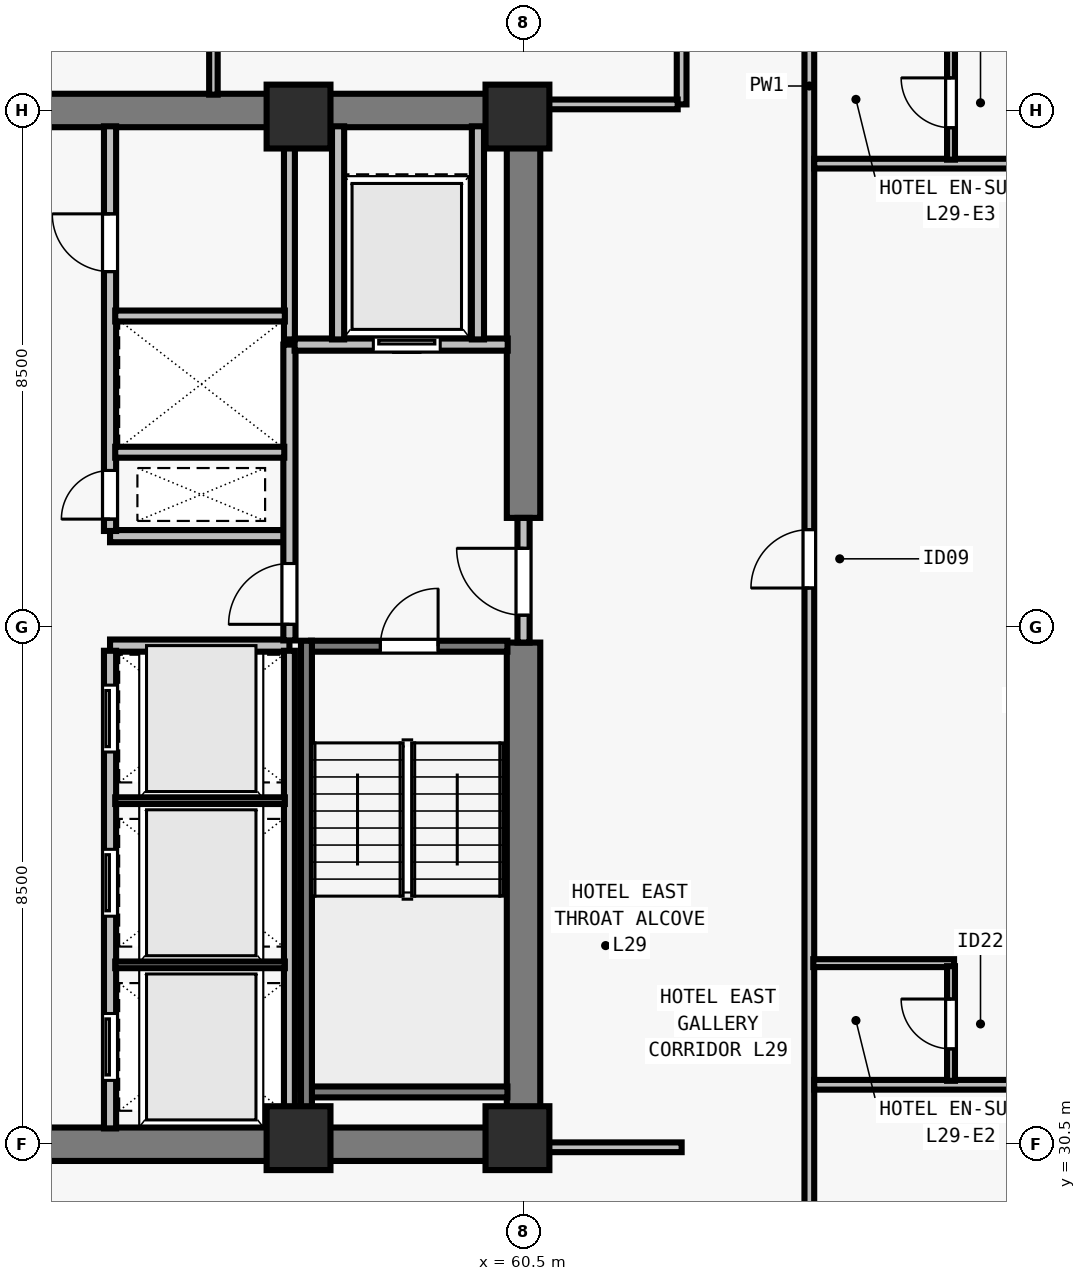
"""IFC4 building model, lengths in metres.
Left out: names, types, materials, properties, quantities, classifications, styles, units other than length and angle.
Written with IfcOpenShell. Run it as: python <this file> out.ifc"""

import sys

from ifc_helpers import new_model, si_unit, direction, frame, frame_2d, origin, origin_2d, place, context, subcontext, project, spatial, rectangle, extrude, element, fill, save


model = new_model("IFC4")
c1 = context("Model", 3, precision=1e-05, world=origin(), true_north=direction((0.0, 1.0)))
c2 = subcontext(c1, "Body", "Model", "MODEL_VIEW")
j1 = project(units=[si_unit("LENGTHUNIT", "METRE"), si_unit("PLANEANGLEUNIT", "RADIAN")], contexts=[c1])
p1 = place(None, origin())
s1 = spatial("IfcSite", under=j1, at=p1, CompositionType="ELEMENT")
p2 = place(p1, origin())
s2 = spatial("IfcBuilding", under=s1, at=p2, CompositionType="ELEMENT")
p3 = place(p2, frame((0.0, 0.0, 109.5)))
s3 = spatial("IfcBuildingStorey", under=s2, at=p3, CompositionType="ELEMENT", Elevation=109.5)
for number, where, z_axis, x_axis in (
    (1, (56.8, 30.6, 0.0), (0.0, 0.0, 1.0), (1.0, 0.0, 0.0)),
    (2, (60.4, 30.6, 0.0), (0.0, 0.0, 1.0), (1.0, 0.0, 0.0)),
    (3, (56.8, 47.4, 0.0), (0.0, 0.0, 1.0), (1.0, 0.0, 0.0)),
    (4, (60.4, 47.4, 0.0), (0.0, 0.0, 1.0), (1.0, 0.0, 0.0)),
):
    element("IfcColumn", number, at=place(p3, frame(where, z_axis=z_axis, x_axis=x_axis)), inside=s3, PredefinedType="COLUMN", context=c2, shape_type="SweptSolid", body=[
        extrude(rectangle(XDim=1.05, YDim=1.05, at=origin_2d()), origin(), (0.0, 0.0, 1.0), 3.5),
    ])
for number, where, z_axis, x_axis in (
    (5, (43.225, 30.5, 0.0), (0.0, 0.0, 1.0), (1.0, 0.0, 0.0)),
    (6, (43.225, 47.5, 0.0), (0.0, 0.0, 1.0), (1.0, 0.0, 0.0)),
):
    element("IfcWall", number, at=place(p3, frame(where, z_axis=z_axis, x_axis=x_axis)), inside=s3, PredefinedType="SHEAR", context=c2, shape_type="SweptSolid", body=[
        extrude(rectangle(XDim=17.55, YDim=0.55, at=frame_2d((8.775, 0.0))), origin(), (0.0, 0.0, 1.0), 3.28),
    ])
p4 = place(p3, frame((60.5, 30.765, 0.0), z_axis=(0.0, 0.0, 1.0), x_axis=(0.0, 1.0, 0.0)))
e7 = element("IfcWall", 7, at=p4, inside=s3, PredefinedType="SHEAR", context=c2, shape_type="SweptSolid", body=[
    extrude(rectangle(XDim=7.985, YDim=0.55, at=frame_2d((3.993, 0.0))), origin(), (0.0, 0.0, 1.0), 3.28),
])
p5 = place(p3, frame((60.5, 40.8, 0.0), z_axis=(0.0, 0.0, 1.0), x_axis=(0.0, 1.0, 0.0)))
e8 = element("IfcWall", 8, at=p5, inside=s3, PredefinedType="SHEAR", context=c2, shape_type="SweptSolid", body=[
    extrude(rectangle(XDim=6.435, YDim=0.55, at=frame_2d((3.218, 0.0))), origin(), (0.0, 0.0, 1.0), 3.28),
])
for number, where, z_axis, x_axis in (
    (9, (53.7, 38.7, 0.0), (0.0, 0.0, 1.0), (1.0, 0.0, 0.0)),
    (10, (53.7, 40.5, 0.0), (0.0, 0.0, 1.0), (1.0, 0.0, 0.0)),
):
    element("IfcWall", number, at=place(p3, frame(where, z_axis=z_axis, x_axis=x_axis)), inside=s3, PredefinedType="SOLIDWALL", context=c2, shape_type="SweptSolid", body=[
        extrude(rectangle(XDim=2.95, YDim=0.2, at=frame_2d((1.475, 0.0))), origin(), (0.0, 0.0, 1.0), 3.28),
    ])
p6 = place(p3, frame((53.7, 30.76, 0.0), z_axis=(0.0, 0.0, 1.0), x_axis=(0.0, 1.0, 0.0)))
e11 = element("IfcWall", 11, at=p6, inside=s3, PredefinedType="SOLIDWALL", context=c2, shape_type="SweptSolid", body=[
    extrude(rectangle(XDim=7.855, YDim=0.2, at=frame_2d((3.927, 0.0))), origin(), (0.0, 0.0, 1.0), 3.28),
])
p7 = place(p6, frame((0.79, 0.0, 0.0)))
e12 = element("IfcOpeningElement", 12, at=p7, cuts=e11, PredefinedType="OPENING", context=c2, shape_type="SweptSolid", body=[
    extrude(rectangle(XDim=1.1, YDim=2.2, at=frame_2d((0.55, 1.1))), frame((0.0, 0.11, 0.0), z_axis=(0.0, -1.0, 0.0), x_axis=(1.0, 0.0, 0.0)), (0.0, 0.0, 1.0), 0.22),
])
p8 = place(p6, frame((3.49, 0.0, 0.0)))
e13 = element("IfcOpeningElement", 13, at=p8, cuts=e11, PredefinedType="OPENING", context=c2, shape_type="SweptSolid", body=[
    extrude(rectangle(XDim=1.1, YDim=2.2, at=frame_2d((0.55, 1.1))), frame((0.0, 0.11, 0.0), z_axis=(0.0, -1.0, 0.0), x_axis=(1.0, 0.0, 0.0)), (0.0, 0.0, 1.0), 0.22),
])
p9 = place(p6, frame((6.19, 0.0, 0.0)))
e14 = element("IfcOpeningElement", 14, at=p9, cuts=e11, PredefinedType="OPENING", context=c2, shape_type="SweptSolid", body=[
    extrude(rectangle(XDim=1.1, YDim=2.2, at=frame_2d((0.55, 1.1))), frame((0.0, 0.11, 0.0), z_axis=(0.0, -1.0, 0.0), x_axis=(1.0, 0.0, 0.0)), (0.0, 0.0, 1.0), 0.22),
])
p10 = place(p3, frame((53.7, 40.585, 0.0), z_axis=(0.0, 0.0, 1.0), x_axis=(0.0, 1.0, 0.0)))
e15 = element("IfcWall", 15, at=p10, inside=s3, PredefinedType="SOLIDWALL", context=c2, shape_type="SweptSolid", body=[
    extrude(rectangle(XDim=6.655, YDim=0.2, at=frame_2d((3.328, 0.0))), origin(), (0.0, 0.0, 1.0), 3.28),
])
p11 = place(p10, frame((0.195, 0.0, 0.0)))
e16 = element("IfcOpeningElement", 16, at=p11, cuts=e15, PredefinedType="OPENING", context=c2, shape_type="SweptSolid", body=[
    extrude(rectangle(XDim=0.8, YDim=2.08, at=frame_2d((0.4, 1.04))), frame((0.0, 0.11, 0.0), z_axis=(0.0, -1.0, 0.0), x_axis=(1.0, 0.0, 0.0)), (0.0, 0.0, 1.0), 0.22),
])
p12 = place(p10, frame((4.265, 0.0, 0.0)))
e17 = element("IfcOpeningElement", 17, at=p12, cuts=e15, PredefinedType="OPENING", context=c2, shape_type="SweptSolid", body=[
    extrude(rectangle(XDim=0.95, YDim=2.12, at=frame_2d((0.475, 1.06))), frame((0.0, 0.11, 0.0), z_axis=(0.0, -1.0, 0.0), x_axis=(1.0, 0.0, 0.0)), (0.0, 0.0, 1.0), 0.22),
])
p13 = place(p3, frame((60.5, 38.75, 0.0), z_axis=(0.0, 0.0, 1.0), x_axis=(0.0, 1.0, 0.0)))
e18 = element("IfcWall", 18, at=p13, inside=s3, PredefinedType="SOLIDWALL", context=c2, shape_type="SweptSolid", body=[
    extrude(rectangle(XDim=2.05, YDim=0.2, at=frame_2d((1.025, 0.0))), origin(), (0.0, 0.0, 1.0), 3.28),
])
p14 = place(p13, frame((0.45, 0.0, 0.0)))
e19 = element("IfcOpeningElement", 19, at=p14, cuts=e18, PredefinedType="OPENING", context=c2, shape_type="SweptSolid", body=[
    extrude(rectangle(XDim=1.1, YDim=2.15, at=frame_2d((0.55, 1.075))), frame((0.0, 0.11, 0.0), z_axis=(0.0, -1.0, 0.0), x_axis=(1.0, 0.0, 0.0)), (0.0, 0.0, 1.0), 0.22),
])
p15 = place(p3, frame((56.65, 38.785, 0.0), z_axis=(0.0, 0.0, 1.0), x_axis=(0.0, 1.0, 0.0)))
e20 = element("IfcWall", 20, at=p15, inside=s3, PredefinedType="SOLIDWALL", context=c2, shape_type="SweptSolid", body=[
    extrude(rectangle(XDim=4.865, YDim=0.2, at=frame_2d((2.433, 0.0))), origin(), (0.0, 0.0, 1.0), 3.28),
])
p16 = place(p15, frame((0.265, 0.0, 0.0)))
e21 = element("IfcOpeningElement", 21, at=p16, cuts=e20, PredefinedType="OPENING", context=c2, shape_type="SweptSolid", body=[
    extrude(rectangle(XDim=1.0, YDim=2.15, at=frame_2d((0.5, 1.075))), frame((0.0, 0.11, 0.0), z_axis=(0.0, -1.0, 0.0), x_axis=(1.0, 0.0, 0.0)), (0.0, 0.0, 1.0), 0.22),
])
p17 = place(p3, frame((56.735, 43.65, 0.0), z_axis=(0.0, 0.0, 1.0), x_axis=(1.0, 0.0, 0.0)))
e22 = element("IfcWall", 22, at=p17, inside=s3, PredefinedType="SOLIDWALL", context=c2, shape_type="SweptSolid", body=[
    extrude(rectangle(XDim=3.505, YDim=0.2, at=frame_2d((1.752, 0.0))), origin(), (0.0, 0.0, 1.0), 3.28),
])
p18 = place(p17, frame((1.295, 0.0, 0.0)))
e23 = element("IfcOpeningElement", 23, at=p18, cuts=e22, PredefinedType="OPENING", context=c2, shape_type="SweptSolid", body=[
    extrude(rectangle(XDim=1.1, YDim=2.2, at=frame_2d((0.55, 1.1))), frame((0.0, 0.11, 0.0), z_axis=(0.0, -1.0, 0.0), x_axis=(1.0, 0.0, 0.0)), (0.0, 0.0, 1.0), 0.22),
])
for number, where, z_axis, x_axis in (
    (24, (57.45, 43.735, 0.0), (0.0, 0.0, 1.0), (0.0, 1.0, 0.0)),
    (25, (59.75, 43.735, 0.0), (0.0, 0.0, 1.0), (0.0, 1.0, 0.0)),
):
    element("IfcWall", number, at=place(p3, frame(where, z_axis=z_axis, x_axis=x_axis)), inside=s3, PredefinedType="SOLIDWALL", context=c2, shape_type="SweptSolid", body=[
        extrude(rectangle(XDim=3.505, YDim=0.2, at=frame_2d((1.752, 0.0))), origin(), (0.0, 0.0, 1.0), 3.28),
    ])
p19 = place(p3, frame((56.65, 30.76, 0.0), z_axis=(0.0, 0.0, 1.0), x_axis=(0.0, 1.0, 0.0)))
e26 = element("IfcWall", 26, at=p19, inside=s3, PredefinedType="SOLIDWALL", context=c2, shape_type="SweptSolid", body=[
    extrude(rectangle(XDim=7.855, YDim=0.18, at=frame_2d((3.927, 0.0))), origin(), (0.0, 0.0, 1.0), 3.28),
])
for number, where, z_axis, x_axis in (
    (27, (53.785, 33.45, 0.0), (0.0, 0.0, 1.0), (1.0, 0.0, 0.0)),
    (28, (53.785, 36.15, 0.0), (0.0, 0.0, 1.0), (1.0, 0.0, 0.0)),
):
    element("IfcWall", number, at=place(p3, frame(where, z_axis=z_axis, x_axis=x_axis)), inside=s3, PredefinedType="PARTITIONING", context=c2, shape_type="SweptSolid", body=[
        extrude(rectangle(XDim=2.79, YDim=0.11, at=frame_2d((1.395, 0.0))), origin(), (0.0, 0.0, 1.0), 3.28),
    ])
p20 = place(p3, frame((56.65, 43.735, 0.0), z_axis=(0.0, 0.0, 1.0), x_axis=(0.0, 1.0, 0.0)))
e29 = element("IfcWall", 29, at=p20, inside=s3, PredefinedType="SOLIDWALL", context=c2, shape_type="SweptSolid", body=[
    extrude(rectangle(XDim=3.505, YDim=0.18, at=frame_2d((1.752, 0.0))), origin(), (0.0, 0.0, 1.0), 3.28),
])
p21 = place(p3, frame((53.785, 41.88, 0.0), z_axis=(0.0, 0.0, 1.0), x_axis=(1.0, 0.0, 0.0)))
e30 = element("IfcWall", 30, at=p21, inside=s3, PredefinedType="SOLIDWALL", context=c2, shape_type="SweptSolid", body=[
    extrude(rectangle(XDim=2.78, YDim=0.18, at=frame_2d((1.39, 0.0))), origin(), (0.0, 0.0, 1.0), 3.28),
])
p22 = place(p3, frame((53.785, 44.12, 0.0), z_axis=(0.0, 0.0, 1.0), x_axis=(1.0, 0.0, 0.0)))
e31 = element("IfcWall", 31, at=p22, inside=s3, PredefinedType="SOLIDWALL", context=c2, shape_type="SweptSolid", body=[
    extrude(rectangle(XDim=2.79, YDim=0.18, at=frame_2d((1.395, 0.0))), origin(), (0.0, 0.0, 1.0), 3.28),
])
p23 = place(p3, frame((65.2, 15.325, 0.0), z_axis=(0.0, 0.0, 1.0), x_axis=(0.0, 1.0, 0.0)))
e32 = element("IfcWall", 32, at=p23, inside=s3, PredefinedType="PARTITIONING", context=c2, shape_type="SweptSolid", body=[
    extrude(rectangle(XDim=47.35, YDim=0.16, at=frame_2d((23.675, 0.0))), origin(), (0.0, 0.0, 1.0), 2.555),
])
p24 = place(p23, frame((8.944, 0.0, 0.0)))
e33 = element("IfcOpeningElement", 33, at=p24, cuts=e32, PredefinedType="OPENING", context=c2, shape_type="SweptSolid", body=[
    extrude(rectangle(XDim=0.96, YDim=2.15, at=frame_2d((0.48, 1.075))), frame((0.0, 0.09, 0.0), z_axis=(0.0, -1.0, 0.0), x_axis=(1.0, 0.0, 0.0)), (0.0, 0.0, 1.0), 0.18),
])
p25 = place(p23, frame((24.322, 0.0, 0.0)))
e34 = element("IfcOpeningElement", 34, at=p25, cuts=e32, PredefinedType="OPENING", context=c2, shape_type="SweptSolid", body=[
    extrude(rectangle(XDim=0.96, YDim=2.15, at=frame_2d((0.48, 1.075))), frame((0.0, 0.09, 0.0), z_axis=(0.0, -1.0, 0.0), x_axis=(1.0, 0.0, 0.0)), (0.0, 0.0, 1.0), 0.18),
])
p26 = place(p23, frame((39.873, 0.0, 0.0)))
e35 = element("IfcOpeningElement", 35, at=p26, cuts=e32, PredefinedType="OPENING", context=c2, shape_type="SweptSolid", body=[
    extrude(rectangle(XDim=0.96, YDim=2.15, at=frame_2d((0.48, 1.075))), frame((0.0, 0.09, 0.0), z_axis=(0.0, -1.0, 0.0), x_axis=(1.0, 0.0, 0.0)), (0.0, 0.0, 1.0), 0.18),
])
p27 = place(p3, frame((63.1, 47.6, 0.0), z_axis=(0.0, 0.0, 1.0), x_axis=(0.0, 1.0, 0.0)))
e36 = element("IfcWall", 36, at=p27, inside=s3, PredefinedType="PARTITIONING", context=c2, shape_type="SweptSolid", body=[
    extrude(rectangle(XDim=15.075, YDim=0.16, at=frame_2d((7.538, 0.0))), origin(), (0.0, 0.0, 1.0), 2.555),
])
p28 = place(p27, frame((3.5, 0.0, 0.0)))
e37 = element("IfcOpeningElement", 37, at=p28, cuts=e36, PredefinedType="OPENING", context=c2, shape_type="SweptSolid", body=[
    extrude(rectangle(XDim=0.96, YDim=2.12, at=frame_2d((0.48, 1.06))), frame((0.0, 0.09, 0.0), z_axis=(0.0, -1.0, 0.0), x_axis=(1.0, 0.0, 0.0)), (0.0, 0.0, 1.0), 0.18),
])
p29 = place(p3, frame((60.765, 30.45, 0.0), z_axis=(0.0, 0.0, 1.0), x_axis=(1.0, 0.0, 0.0)))
e38 = element("IfcWall", 38, at=p29, inside=s3, PredefinedType="PARTITIONING", context=c2, shape_type="SweptSolid", body=[
    extrude(rectangle(XDim=2.335, YDim=0.16, at=frame_2d((1.167, 0.0))), origin(), (0.0, 0.0, 1.0), 3.28),
])
p30 = place(p3, frame((60.765, 47.6, 0.0), z_axis=(0.0, 0.0, 1.0), x_axis=(1.0, 0.0, 0.0)))
e39 = element("IfcWall", 39, at=p30, inside=s3, PredefinedType="PARTITIONING", context=c2, shape_type="SweptSolid", body=[
    extrude(rectangle(XDim=2.27, YDim=0.16, at=frame_2d((1.135, 0.0))), origin(), (0.0, 0.0, 1.0), 3.28),
])
p31 = place(p3, frame((55.4, 47.76, 0.0), z_axis=(0.0, 0.0, 1.0), x_axis=(0.0, 1.0, 0.0)))
e40 = element("IfcWall", 40, at=p31, inside=s3, PredefinedType="PARTITIONING", context=c2, shape_type="SweptSolid", body=[
    extrude(rectangle(XDim=14.915, YDim=0.14, at=frame_2d((7.458, 0.0))), origin(), (0.0, 0.0, 1.0), 2.896),
])
p32 = place(p3, frame((65.28, 31.478, 0.0), z_axis=(0.0, 0.0, 1.0), x_axis=(1.0, 0.0, 0.0)))
e41 = element("IfcWall", 41, at=p32, inside=s3, PredefinedType="PARTITIONING", context=c2, shape_type="SweptSolid", body=[
    extrude(rectangle(XDim=10.395, YDim=0.16, at=frame_2d((5.198, 0.0))), origin(), (0.0, 0.0, 1.0), 3.28),
])
p33 = place(p3, frame((65.265, 33.478, 0.0), z_axis=(0.0, 0.0, 1.0), x_axis=(1.0, 0.0, 0.0)))
e42 = element("IfcWall", 42, at=p33, inside=s3, PredefinedType="PLUMBINGWALL", context=c2, shape_type="SweptSolid", body=[
    extrude(rectangle(XDim=2.315, YDim=0.13, at=frame_2d((1.158, 0.0))), origin(), (0.0, 0.0, 1.0), 3.28),
])
p34 = place(p3, frame((67.53, 31.543, 0.0), z_axis=(0.0, 0.0, 1.0), x_axis=(0.0, 1.0, 0.0)))
e43 = element("IfcWall", 43, at=p34, inside=s3, PredefinedType="PLUMBINGWALL", context=c2, shape_type="SweptSolid", body=[
    extrude(rectangle(XDim=1.885, YDim=0.13, at=frame_2d((0.942, 0.0))), origin(), (0.0, 0.0, 1.0), 3.28),
])
p35 = place(p34, frame((0.525, 0.0, 0.0)))
e44 = element("IfcOpeningElement", 44, at=p35, cuts=e43, PredefinedType="OPENING", context=c2, shape_type="SweptSolid", body=[
    extrude(rectangle(XDim=0.82, YDim=2.1, at=frame_2d((0.41, 1.05))), frame((0.0, 0.075, 0.0), z_axis=(0.0, -1.0, 0.0), x_axis=(1.0, 0.0, 0.0)), (0.0, 0.0, 1.0), 0.15),
])
p36 = place(p3, frame((65.28, 46.626, 0.0), z_axis=(0.0, 0.0, 1.0), x_axis=(1.0, 0.0, 0.0)))
e45 = element("IfcWall", 45, at=p36, inside=s3, PredefinedType="PARTITIONING", context=c2, shape_type="SweptSolid", body=[
    extrude(rectangle(XDim=10.395, YDim=0.16, at=frame_2d((5.198, 0.0))), origin(), (0.0, 0.0, 1.0), 3.28),
])
p37 = place(p3, frame((67.53, 46.691, 0.0), z_axis=(0.0, 0.0, 1.0), x_axis=(0.0, 1.0, 0.0)))
e46 = element("IfcWall", 46, at=p37, inside=s3, PredefinedType="PLUMBINGWALL", context=c2, shape_type="SweptSolid", body=[
    extrude(rectangle(XDim=1.885, YDim=0.13, at=frame_2d((0.942, 0.0))), origin(), (0.0, 0.0, 1.0), 3.28),
])
p38 = place(p37, frame((0.525, 0.0, 0.0)))
e47 = element("IfcOpeningElement", 47, at=p38, cuts=e46, PredefinedType="OPENING", context=c2, shape_type="SweptSolid", body=[
    extrude(rectangle(XDim=0.82, YDim=2.1, at=frame_2d((0.41, 1.05))), frame((0.0, 0.075, 0.0), z_axis=(0.0, -1.0, 0.0), x_axis=(1.0, 0.0, 0.0)), (0.0, 0.0, 1.0), 0.15),
])
p39 = place(p3, frame((57.005, 38.69, 0.0), z_axis=(0.0, 0.0, 1.0), x_axis=(1.0, 0.0, 0.0)))
e48 = element("IfcWall", 48, at=p39, inside=s3, PredefinedType="SOLIDWALL", context=c2, shape_type="SweptSolid", body=[
    extrude(rectangle(XDim=3.23, YDim=0.18, at=frame_2d((1.615, 0.0))), origin(), (0.0, 0.0, 1.0), 3.28),
])
p40 = place(p39, frame((1.14, 0.0, 0.0)))
e49 = element("IfcOpeningElement", 49, at=p40, cuts=e48, PredefinedType="OPENING", context=c2, shape_type="SweptSolid", body=[
    extrude(rectangle(XDim=0.95, YDim=2.15, at=frame_2d((0.475, 1.075))), frame((0.0, 0.1, 0.0), z_axis=(0.0, -1.0, 0.0), x_axis=(1.0, 0.0, 0.0)), (0.0, 0.0, 1.0), 0.2),
])
p41 = place(p3, frame((57.005, 31.36, 0.0), z_axis=(0.0, 0.0, 1.0), x_axis=(1.0, 0.0, 0.0)))
e50 = element("IfcWall", 50, at=p41, inside=s3, PredefinedType="SOLIDWALL", context=c2, shape_type="SweptSolid", body=[
    extrude(rectangle(XDim=3.23, YDim=0.18, at=frame_2d((1.615, 0.0))), origin(), (0.0, 0.0, 1.0), 3.28),
])
p42 = place(p3, frame((56.93, 38.78, 0.0), z_axis=(0.0, 0.0, 1.0), x_axis=(0.0, -1.0, 0.0)))
e51 = element("IfcWall", 51, at=p42, inside=s3, PredefinedType="SOLIDWALL", context=c2, shape_type="SweptSolid", body=[
    extrude(rectangle(XDim=8.017, YDim=0.18, at=frame_2d((4.009, 0.0))), origin(), (0.0, 0.0, 1.0), 3.28),
])
p43 = place(p14, origin())
e52 = element("IfcDoor", 52, at=p43, inside=s3, OperationType="SINGLE_SWING_RIGHT", PredefinedType="DOOR", context=c2, shape_type="SweptSolid", body=[
    extrude(rectangle(XDim=1.1, YDim=2.15, at=frame_2d((0.55, 1.075))), frame((0.0, 0.025, 0.0), z_axis=(0.0, -1.0, 0.0), x_axis=(1.0, 0.0, 0.0)), (0.0, 0.0, 1.0), 0.05),
])
fill(e19, e52)
p44 = place(p16, origin())
e53 = element("IfcDoor", 53, at=p44, inside=s3, OperationType="SINGLE_SWING_LEFT", PredefinedType="DOOR", context=c2, shape_type="SweptSolid", body=[
    extrude(rectangle(XDim=1.0, YDim=2.15, at=frame_2d((0.5, 1.075))), frame((0.0, 0.025, 0.0), z_axis=(0.0, -1.0, 0.0), x_axis=(1.0, 0.0, 0.0)), (0.0, 0.0, 1.0), 0.05),
])
fill(e21, e53)
p45 = place(p18, origin())
e54 = element("IfcDoor", 54, at=p45, inside=s3, OperationType="SLIDING_TO_LEFT", PredefinedType="DOOR", context=c2, shape_type="SweptSolid", body=[
    extrude(rectangle(XDim=1.1, YDim=2.2, at=frame_2d((0.55, 1.1))), frame((0.0, 0.025, 0.0), z_axis=(0.0, -1.0, 0.0), x_axis=(1.0, 0.0, 0.0)), (0.0, 0.0, 1.0), 0.05),
])
fill(e23, e54)
p46 = place(p7, origin())
e55 = element("IfcDoor", 55, at=p46, inside=s3, OperationType="SLIDING_TO_LEFT", PredefinedType="DOOR", context=c2, shape_type="SweptSolid", body=[
    extrude(rectangle(XDim=1.1, YDim=2.2, at=frame_2d((0.55, 1.1))), frame((0.0, 0.025, 0.0), z_axis=(0.0, -1.0, 0.0), x_axis=(1.0, 0.0, 0.0)), (0.0, 0.0, 1.0), 0.05),
])
fill(e12, e55)
p47 = place(p8, origin())
e56 = element("IfcDoor", 56, at=p47, inside=s3, OperationType="SLIDING_TO_LEFT", PredefinedType="DOOR", context=c2, shape_type="SweptSolid", body=[
    extrude(rectangle(XDim=1.1, YDim=2.2, at=frame_2d((0.55, 1.1))), frame((0.0, 0.025, 0.0), z_axis=(0.0, -1.0, 0.0), x_axis=(1.0, 0.0, 0.0)), (0.0, 0.0, 1.0), 0.05),
])
fill(e13, e56)
p48 = place(p9, origin())
e57 = element("IfcDoor", 57, at=p48, inside=s3, OperationType="SLIDING_TO_LEFT", PredefinedType="DOOR", context=c2, shape_type="SweptSolid", body=[
    extrude(rectangle(XDim=1.1, YDim=2.2, at=frame_2d((0.55, 1.1))), frame((0.0, 0.025, 0.0), z_axis=(0.0, -1.0, 0.0), x_axis=(1.0, 0.0, 0.0)), (0.0, 0.0, 1.0), 0.05),
])
fill(e14, e57)
p49 = place(p11, origin())
e58 = element("IfcDoor", 58, at=p49, inside=s3, OperationType="SINGLE_SWING_LEFT", PredefinedType="DOOR", context=c2, shape_type="SweptSolid", body=[
    extrude(rectangle(XDim=0.8, YDim=2.08, at=frame_2d((0.4, 1.04))), frame((0.0, 0.025, 0.0), z_axis=(0.0, -1.0, 0.0), x_axis=(1.0, 0.0, 0.0)), (0.0, 0.0, 1.0), 0.05),
])
fill(e16, e58)
p50 = place(p12, origin())
e59 = element("IfcDoor", 59, at=p50, inside=s3, OperationType="SINGLE_SWING_RIGHT", PredefinedType="DOOR", context=c2, shape_type="SweptSolid", body=[
    extrude(rectangle(XDim=0.95, YDim=2.12, at=frame_2d((0.475, 1.06))), frame((0.0, 0.025, 0.0), z_axis=(0.0, -1.0, 0.0), x_axis=(1.0, 0.0, 0.0)), (0.0, 0.0, 1.0), 0.05),
])
fill(e17, e59)
p51 = place(p35, origin())
e60 = element("IfcDoor", 60, at=p51, inside=s3, OperationType="SINGLE_SWING_RIGHT", PredefinedType="DOOR", context=c2, shape_type="SweptSolid", body=[
    extrude(rectangle(XDim=0.82, YDim=2.1, at=frame_2d((0.41, 1.05))), frame((0.0, 0.025, 0.0), z_axis=(0.0, -1.0, 0.0), x_axis=(1.0, 0.0, 0.0)), (0.0, 0.0, 1.0), 0.05),
])
fill(e44, e60)
p52 = place(p25, origin())
e61 = element("IfcDoor", 61, at=p52, inside=s3, OperationType="SINGLE_SWING_LEFT", PredefinedType="DOOR", context=c2, shape_type="SweptSolid", body=[
    extrude(rectangle(XDim=0.96, YDim=2.15, at=frame_2d((0.48, 1.075))), frame((0.0, 0.025, 0.0), z_axis=(0.0, -1.0, 0.0), x_axis=(1.0, 0.0, 0.0)), (0.0, 0.0, 1.0), 0.05),
])
fill(e34, e61)
p53 = place(p38, origin())
e62 = element("IfcDoor", 62, at=p53, inside=s3, OperationType="SINGLE_SWING_RIGHT", PredefinedType="DOOR", context=c2, shape_type="SweptSolid", body=[
    extrude(rectangle(XDim=0.82, YDim=2.1, at=frame_2d((0.41, 1.05))), frame((0.0, 0.025, 0.0), z_axis=(0.0, -1.0, 0.0), x_axis=(1.0, 0.0, 0.0)), (0.0, 0.0, 1.0), 0.05),
])
fill(e47, e62)
p54 = place(p40, origin())
e63 = element("IfcDoor", 63, at=p54, inside=s3, OperationType="SINGLE_SWING_RIGHT", PredefinedType="DOOR", context=c2, shape_type="SweptSolid", body=[
    extrude(rectangle(XDim=0.95, YDim=2.15, at=frame_2d((0.475, 1.075))), frame((0.0, 0.025, 0.0), z_axis=(0.0, -1.0, 0.0), x_axis=(1.0, 0.0, 0.0)), (0.0, 0.0, 1.0), 0.05),
])
fill(e49, e63)
save(model, sys.argv[1])
